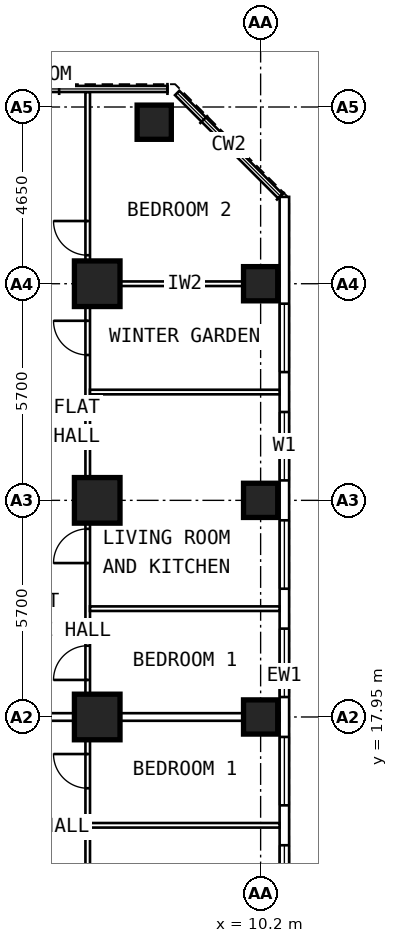
"""IFC4 building model, lengths in metres.
Left out: names, types, materials, properties, quantities, classifications, styles, units other than length and angle.
Written with IfcOpenShell. Run it as: python <this file> out.ifc"""

import sys

from ifc_helpers import new_model, si_unit, direction, frame, frame_2d, origin, origin_2d, place, context, subcontext, project, spatial, rectangle, extrude, element, fill, save


model = new_model("IFC4")
c1 = context("Model", 3, precision=1e-05, world=origin(), true_north=direction((0.0, 1.0)))
c2 = subcontext(c1, "Body", "Model", "MODEL_VIEW")
j1 = project(units=[si_unit("LENGTHUNIT", "METRE"), si_unit("PLANEANGLEUNIT", "RADIAN")], contexts=[c1])
p1 = place(None, origin())
s1 = spatial("IfcSite", under=j1, at=p1, CompositionType="ELEMENT")
p2 = place(p1, origin())
s2 = spatial("IfcBuilding", under=s1, at=p2, CompositionType="ELEMENT")
p3 = place(p2, frame((0.0, 0.0, 95.2)))
s3 = spatial("IfcBuildingStorey", under=s2, at=p3, CompositionType="ELEMENT", Elevation=95.2)
for number, where, z_axis, x_axis in (
    (1, (10.2, 17.95, 0.0), (0.0, 0.0, 1.0), (0.0, 1.0, 0.0)),
    (2, (10.2, 23.65, 0.0), (0.0, 0.0, 1.0), (0.0, 1.0, 0.0)),
    (3, (10.2, 29.35, 0.0), (0.0, 0.0, 1.0), (0.0, 1.0, 0.0)),
    (4, (7.4, 33.6, 0.0), (0.0, 0.0, 1.0), (0.0, 1.0, 0.0)),
):
    element("IfcColumn", number, at=place(p3, frame(where, z_axis=z_axis, x_axis=x_axis)), inside=s3, PredefinedType="COLUMN", context=c2, shape_type="SweptSolid", body=[
        extrude(rectangle(XDim=0.9, YDim=0.9, at=origin_2d()), origin(), (0.0, 0.0, 1.0), 3.6),
    ])
for number, where, z_axis, x_axis in (
    (5, (5.9, 17.95, 0.0), (0.0, 0.0, 1.0), (0.0, 1.0, 0.0)),
    (6, (5.9, 23.65, 0.0), (0.0, 0.0, 1.0), (0.0, 1.0, 0.0)),
    (7, (5.9, 29.35, 0.0), (0.0, 0.0, 1.0), (0.0, 1.0, 0.0)),
):
    element("IfcColumn", number, at=place(p3, frame(where, z_axis=z_axis, x_axis=x_axis)), inside=s3, PredefinedType="COLUMN", context=c2, shape_type="SweptSolid", body=[
        extrude(rectangle(XDim=1.2, YDim=1.2, at=origin_2d()), origin(), (0.0, 0.0, 1.0), 3.6),
    ])
p4 = place(p3, frame((10.825, 6.409, 0.0), z_axis=(0.0, 0.0, 1.0), x_axis=(0.0, 1.0, 0.0)))
e8 = element("IfcWall", 8, at=p4, inside=s3, PredefinedType="SOLIDWALL", context=c2, shape_type="SweptSolid", body=[
    extrude(rectangle(XDim=25.226, YDim=0.25, at=frame_2d((12.613, 0.0))), origin(), (0.0, 0.0, 1.0), 3.35),
])
p5 = place(p4, frame((0.666, 0.0, 0.8)))
e9 = element("IfcOpeningElement", 9, at=p5, cuts=e8, PredefinedType="OPENING", context=c2, shape_type="SweptSolid", body=[
    extrude(rectangle(XDim=1.8, YDim=1.8, at=frame_2d((0.9, 0.9))), frame((0.0, 0.137, 0.0), z_axis=(0.0, -1.0, 0.0), x_axis=(1.0, 0.0, 0.0)), (0.0, 0.0, 1.0), 0.274),
])
p6 = place(p4, frame((3.516, 0.0, 0.8)))
e10 = element("IfcOpeningElement", 10, at=p6, cuts=e8, PredefinedType="OPENING", context=c2, shape_type="SweptSolid", body=[
    extrude(rectangle(XDim=1.8, YDim=1.8, at=frame_2d((0.9, 0.9))), frame((0.0, 0.137, 0.0), z_axis=(0.0, -1.0, 0.0), x_axis=(1.0, 0.0, 0.0)), (0.0, 0.0, 1.0), 0.274),
])
p7 = place(p4, frame((6.366, 0.0, 0.8)))
e11 = element("IfcOpeningElement", 11, at=p7, cuts=e8, PredefinedType="OPENING", context=c2, shape_type="SweptSolid", body=[
    extrude(rectangle(XDim=1.8, YDim=1.8, at=frame_2d((0.9, 0.9))), frame((0.0, 0.137, 0.0), z_axis=(0.0, -1.0, 0.0), x_axis=(1.0, 0.0, 0.0)), (0.0, 0.0, 1.0), 0.274),
])
p8 = place(p4, frame((9.216, 0.0, 0.8)))
e12 = element("IfcOpeningElement", 12, at=p8, cuts=e8, PredefinedType="OPENING", context=c2, shape_type="SweptSolid", body=[
    extrude(rectangle(XDim=1.8, YDim=1.8, at=frame_2d((0.9, 0.9))), frame((0.0, 0.137, 0.0), z_axis=(0.0, -1.0, 0.0), x_axis=(1.0, 0.0, 0.0)), (0.0, 0.0, 1.0), 0.274),
])
p9 = place(p4, frame((12.066, 0.0, 0.8)))
e13 = element("IfcOpeningElement", 13, at=p9, cuts=e8, PredefinedType="OPENING", context=c2, shape_type="SweptSolid", body=[
    extrude(rectangle(XDim=1.8, YDim=1.8, at=frame_2d((0.9, 0.9))), frame((0.0, 0.137, 0.0), z_axis=(0.0, -1.0, 0.0), x_axis=(1.0, 0.0, 0.0)), (0.0, 0.0, 1.0), 0.274),
])
p10 = place(p4, frame((14.916, 0.0, 0.8)))
e14 = element("IfcOpeningElement", 14, at=p10, cuts=e8, PredefinedType="OPENING", context=c2, shape_type="SweptSolid", body=[
    extrude(rectangle(XDim=1.8, YDim=1.8, at=frame_2d((0.9, 0.9))), frame((0.0, 0.137, 0.0), z_axis=(0.0, -1.0, 0.0), x_axis=(1.0, 0.0, 0.0)), (0.0, 0.0, 1.0), 0.274),
])
p11 = place(p4, frame((17.766, 0.0, 0.8)))
e15 = element("IfcOpeningElement", 15, at=p11, cuts=e8, PredefinedType="OPENING", context=c2, shape_type="SweptSolid", body=[
    extrude(rectangle(XDim=1.8, YDim=1.8, at=frame_2d((0.9, 0.9))), frame((0.0, 0.137, 0.0), z_axis=(0.0, -1.0, 0.0), x_axis=(1.0, 0.0, 0.0)), (0.0, 0.0, 1.0), 0.274),
])
p12 = place(p4, frame((20.616, 0.0, 0.8)))
e16 = element("IfcOpeningElement", 16, at=p12, cuts=e8, PredefinedType="OPENING", context=c2, shape_type="SweptSolid", body=[
    extrude(rectangle(XDim=1.8, YDim=1.8, at=frame_2d((0.9, 0.9))), frame((0.0, 0.137, 0.0), z_axis=(0.0, -1.0, 0.0), x_axis=(1.0, 0.0, 0.0)), (0.0, 0.0, 1.0), 0.274),
])
p13 = place(p3, frame((5.65, 9.6, 0.0), z_axis=(0.0, 0.0, 1.0), x_axis=(0.0, 1.0, 0.0)))
e17 = element("IfcWall", 17, at=p13, inside=s3, PredefinedType="PARTITIONING", context=c2, shape_type="SweptSolid", body=[
    extrude(rectangle(XDim=8.1, YDim=0.12, at=frame_2d((4.05, 0.0))), origin(), (0.0, 0.0, 1.0), 3.35),
])
p14 = place(p13, frame((3.4, 0.0, 0.0)))
e18 = element("IfcOpeningElement", 18, at=p14, cuts=e17, PredefinedType="OPENING", context=c2, shape_type="SweptSolid", body=[
    extrude(rectangle(XDim=0.9, YDim=2.1, at=frame_2d((0.45, 1.05))), frame((0.0, 0.072, 0.0), z_axis=(0.0, -1.0, 0.0), x_axis=(1.0, 0.0, 0.0)), (0.0, 0.0, 1.0), 0.144),
])
p15 = place(p13, frame((6.475, 0.0, 0.0)))
e19 = element("IfcOpeningElement", 19, at=p15, cuts=e17, PredefinedType="OPENING", context=c2, shape_type="SweptSolid", body=[
    extrude(rectangle(XDim=0.9, YDim=2.1, at=frame_2d((0.45, 1.05))), frame((0.0, 0.072, 0.0), z_axis=(0.0, -1.0, 0.0), x_axis=(1.0, 0.0, 0.0)), (0.0, 0.0, 1.0), 0.144),
])
p16 = place(p3, frame((5.71, 15.1, 0.0), z_axis=(0.0, 0.0, 1.0), x_axis=(1.0, 0.0, 0.0)))
e20 = element("IfcWall", 20, at=p16, inside=s3, PredefinedType="PARTITIONING", context=c2, shape_type="SweptSolid", body=[
    extrude(rectangle(XDim=4.99, YDim=0.12, at=frame_2d((2.495, 0.0))), origin(), (0.0, 0.0, 1.0), 3.35),
])
p17 = place(p3, frame((5.65, 18.05, 0.0), z_axis=(0.0, 0.0, 1.0), x_axis=(0.0, 1.0, 0.0)))
e21 = element("IfcWall", 21, at=p17, inside=s3, PredefinedType="PARTITIONING", context=c2, shape_type="SweptSolid", body=[
    extrude(rectangle(XDim=16.345, YDim=0.12, at=frame_2d((8.172, 0.0))), origin(), (0.0, 0.0, 1.0), 3.35),
])
p18 = place(p17, frame((0.875, 0.0, 0.0)))
e22 = element("IfcOpeningElement", 22, at=p18, cuts=e21, PredefinedType="OPENING", context=c2, shape_type="SweptSolid", body=[
    extrude(rectangle(XDim=0.9, YDim=2.1, at=frame_2d((0.45, 1.05))), frame((0.0, 0.072, 0.0), z_axis=(0.0, -1.0, 0.0), x_axis=(1.0, 0.0, 0.0)), (0.0, 0.0, 1.0), 0.144),
])
p19 = place(p17, frame((3.95, 0.0, 0.0)))
e23 = element("IfcOpeningElement", 23, at=p19, cuts=e21, PredefinedType="OPENING", context=c2, shape_type="SweptSolid", body=[
    extrude(rectangle(XDim=0.9, YDim=2.1, at=frame_2d((0.45, 1.05))), frame((0.0, 0.072, 0.0), z_axis=(0.0, -1.0, 0.0), x_axis=(1.0, 0.0, 0.0)), (0.0, 0.0, 1.0), 0.144),
])
p20 = place(p17, frame((9.425, 0.0, 0.0)))
e24 = element("IfcOpeningElement", 24, at=p20, cuts=e21, PredefinedType="OPENING", context=c2, shape_type="SweptSolid", body=[
    extrude(rectangle(XDim=0.9, YDim=2.1, at=frame_2d((0.45, 1.05))), frame((0.0, 0.072, 0.0), z_axis=(0.0, -1.0, 0.0), x_axis=(1.0, 0.0, 0.0)), (0.0, 0.0, 1.0), 0.144),
])
p21 = place(p17, frame((12.05, 0.0, 0.0)))
e25 = element("IfcOpeningElement", 25, at=p21, cuts=e21, PredefinedType="OPENING", context=c2, shape_type="SweptSolid", body=[
    extrude(rectangle(XDim=0.9, YDim=2.1, at=frame_2d((0.45, 1.05))), frame((0.0, 0.072, 0.0), z_axis=(0.0, -1.0, 0.0), x_axis=(1.0, 0.0, 0.0)), (0.0, 0.0, 1.0), 0.144),
])
for number, where, z_axis, x_axis in (
    (26, (5.71, 20.8, 0.0), (0.0, 0.0, 1.0), (1.0, 0.0, 0.0)),
    (27, (5.71, 26.5, 0.0), (0.0, 0.0, 1.0), (1.0, 0.0, 0.0)),
):
    element("IfcWall", number, at=place(p3, frame(where, z_axis=z_axis, x_axis=x_axis)), inside=s3, PredefinedType="PARTITIONING", context=c2, shape_type="SweptSolid", body=[
        extrude(rectangle(XDim=4.99, YDim=0.12, at=frame_2d((2.495, 0.0))), origin(), (0.0, 0.0, 1.0), 3.35),
    ])
p22 = place(p3, frame((5.71, 29.35, 0.0), z_axis=(0.0, 0.0, 1.0), x_axis=(1.0, 0.0, 0.0)))
e28 = element("IfcWall", 28, at=p22, inside=s3, PredefinedType="PARTITIONING", context=c2, shape_type="SweptSolid", body=[
    extrude(rectangle(XDim=4.99, YDim=0.12, at=frame_2d((2.495, 0.0))), origin(), (0.0, 0.0, 1.0), 2.45),
])
p23 = place(p3, frame((2.1, 17.95, 0.0), z_axis=(0.0, 0.0, 1.0), x_axis=(1.0, 0.0, 0.0)))
e29 = element("IfcWall", 29, at=p23, inside=s3, PredefinedType="PARTITIONING", context=c2, shape_type="SweptSolid", body=[
    extrude(rectangle(XDim=8.6, YDim=0.2, at=frame_2d((4.3, 0.0))), origin(), (0.0, 0.0, 1.0), 2.45),
])
p24 = place(p7, origin())
e30 = element("IfcWindow", 30, at=p24, inside=s3, PartitioningType="SINGLE_PANEL", PredefinedType="WINDOW", context=c2, shape_type="SweptSolid", body=[
    extrude(rectangle(XDim=1.8, YDim=1.8, at=frame_2d((0.9, 0.9))), frame((0.0, 0.03, 0.0), z_axis=(0.0, -1.0, 0.0), x_axis=(1.0, 0.0, 0.0)), (0.0, 0.0, 1.0), 0.06),
])
fill(e11, e30)
p25 = place(p8, origin())
e31 = element("IfcWindow", 31, at=p25, inside=s3, PartitioningType="SINGLE_PANEL", PredefinedType="WINDOW", context=c2, shape_type="SweptSolid", body=[
    extrude(rectangle(XDim=1.8, YDim=1.8, at=frame_2d((0.9, 0.9))), frame((0.0, 0.03, 0.0), z_axis=(0.0, -1.0, 0.0), x_axis=(1.0, 0.0, 0.0)), (0.0, 0.0, 1.0), 0.06),
])
fill(e12, e31)
p26 = place(p9, origin())
e32 = element("IfcWindow", 32, at=p26, inside=s3, PartitioningType="SINGLE_PANEL", PredefinedType="WINDOW", context=c2, shape_type="SweptSolid", body=[
    extrude(rectangle(XDim=1.8, YDim=1.8, at=frame_2d((0.9, 0.9))), frame((0.0, 0.03, 0.0), z_axis=(0.0, -1.0, 0.0), x_axis=(1.0, 0.0, 0.0)), (0.0, 0.0, 1.0), 0.06),
])
fill(e13, e32)
p27 = place(p10, origin())
e33 = element("IfcWindow", 33, at=p27, inside=s3, PartitioningType="SINGLE_PANEL", PredefinedType="WINDOW", context=c2, shape_type="SweptSolid", body=[
    extrude(rectangle(XDim=1.8, YDim=1.8, at=frame_2d((0.9, 0.9))), frame((0.0, 0.03, 0.0), z_axis=(0.0, -1.0, 0.0), x_axis=(1.0, 0.0, 0.0)), (0.0, 0.0, 1.0), 0.06),
])
fill(e14, e33)
p28 = place(p11, origin())
e34 = element("IfcWindow", 34, at=p28, inside=s3, PartitioningType="SINGLE_PANEL", PredefinedType="WINDOW", context=c2, shape_type="SweptSolid", body=[
    extrude(rectangle(XDim=1.8, YDim=1.8, at=frame_2d((0.9, 0.9))), frame((0.0, 0.03, 0.0), z_axis=(0.0, -1.0, 0.0), x_axis=(1.0, 0.0, 0.0)), (0.0, 0.0, 1.0), 0.06),
])
fill(e15, e34)
p29 = place(p12, origin())
e35 = element("IfcWindow", 35, at=p29, inside=s3, PartitioningType="SINGLE_PANEL", PredefinedType="WINDOW", context=c2, shape_type="SweptSolid", body=[
    extrude(rectangle(XDim=1.8, YDim=1.8, at=frame_2d((0.9, 0.9))), frame((0.0, 0.03, 0.0), z_axis=(0.0, -1.0, 0.0), x_axis=(1.0, 0.0, 0.0)), (0.0, 0.0, 1.0), 0.06),
])
fill(e16, e35)
p30 = place(p15, origin())
e36 = element("IfcDoor", 36, at=p30, inside=s3, OperationType="SINGLE_SWING_RIGHT", PredefinedType="DOOR", context=c2, shape_type="SweptSolid", body=[
    extrude(rectangle(XDim=0.9, YDim=2.1, at=frame_2d((0.45, 1.05))), frame((0.0, 0.025, 0.0), z_axis=(0.0, -1.0, 0.0), x_axis=(1.0, 0.0, 0.0)), (0.0, 0.0, 1.0), 0.05),
])
fill(e19, e36)
p31 = place(p18, origin())
e37 = element("IfcDoor", 37, at=p31, inside=s3, OperationType="SINGLE_SWING_LEFT", PredefinedType="DOOR", context=c2, shape_type="SweptSolid", body=[
    extrude(rectangle(XDim=0.9, YDim=2.1, at=frame_2d((0.45, 1.05))), frame((0.0, 0.025, 0.0), z_axis=(0.0, -1.0, 0.0), x_axis=(1.0, 0.0, 0.0)), (0.0, 0.0, 1.0), 0.05),
])
fill(e22, e37)
p32 = place(p19, origin())
e38 = element("IfcDoor", 38, at=p32, inside=s3, OperationType="SINGLE_SWING_LEFT", PredefinedType="DOOR", context=c2, shape_type="SweptSolid", body=[
    extrude(rectangle(XDim=0.9, YDim=2.1, at=frame_2d((0.45, 1.05))), frame((0.0, 0.025, 0.0), z_axis=(0.0, -1.0, 0.0), x_axis=(1.0, 0.0, 0.0)), (0.0, 0.0, 1.0), 0.05),
])
fill(e23, e38)
p33 = place(p20, origin())
e39 = element("IfcDoor", 39, at=p33, inside=s3, OperationType="SINGLE_SWING_RIGHT", PredefinedType="DOOR", context=c2, shape_type="SweptSolid", body=[
    extrude(rectangle(XDim=0.9, YDim=2.1, at=frame_2d((0.45, 1.05))), frame((0.0, 0.025, 0.0), z_axis=(0.0, -1.0, 0.0), x_axis=(1.0, 0.0, 0.0)), (0.0, 0.0, 1.0), 0.05),
])
fill(e24, e39)
p34 = place(p21, origin())
e40 = element("IfcDoor", 40, at=p34, inside=s3, OperationType="SINGLE_SWING_RIGHT", PredefinedType="DOOR", context=c2, shape_type="SweptSolid", body=[
    extrude(rectangle(XDim=0.9, YDim=2.1, at=frame_2d((0.45, 1.05))), frame((0.0, 0.025, 0.0), z_axis=(0.0, -1.0, 0.0), x_axis=(1.0, 0.0, 0.0)), (0.0, 0.0, 1.0), 0.05),
])
fill(e25, e40)
save(model, sys.argv[1])
